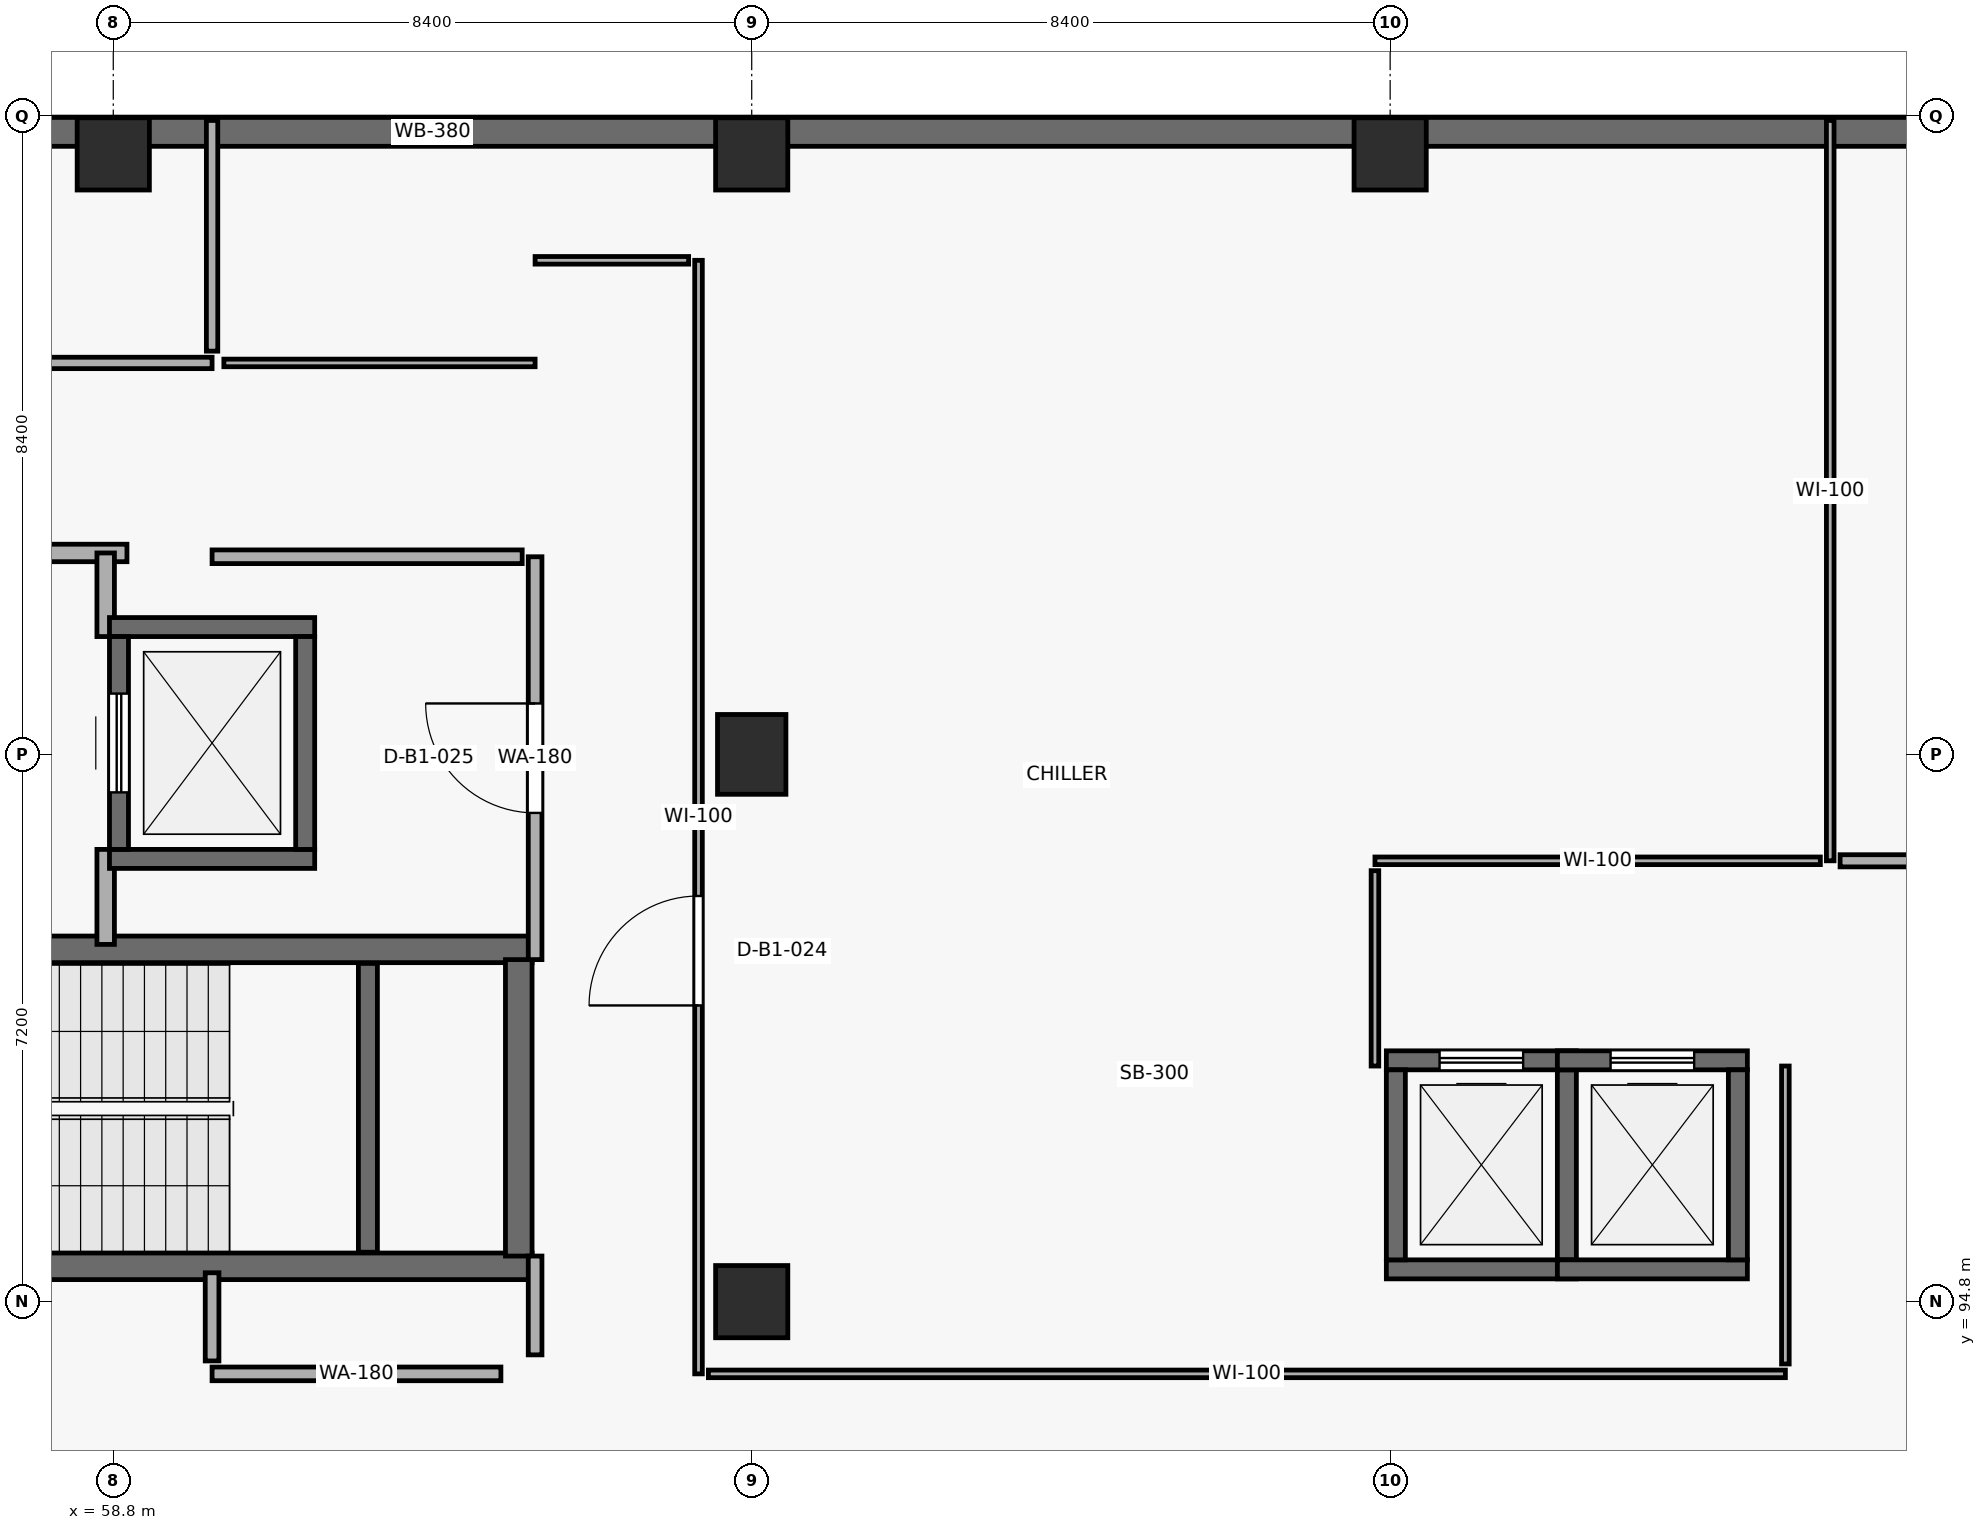
"""IFC4 building model, lengths in metres.
Left out: names, types, materials, properties, quantities, classifications, styles, units other than length and angle.
Written with IfcOpenShell. Run it as: python <this file> out.ifc"""

import sys

from ifc_helpers import new_model, si_unit, direction, frame, frame_2d, origin, origin_2d, place, context, subcontext, project, spatial, rectangle, extrude, element, fill, save


model = new_model("IFC4")
c1 = context("Model", 3, precision=1e-05, world=origin(), true_north=direction((0.0, 1.0)))
c2 = subcontext(c1, "Body", "Model", "MODEL_VIEW")
j1 = project(units=[si_unit("LENGTHUNIT", "METRE"), si_unit("PLANEANGLEUNIT", "RADIAN")], contexts=[c1])
p1 = place(None, origin())
s1 = spatial("IfcSite", under=j1, at=p1, CompositionType="ELEMENT")
p2 = place(p1, origin())
s2 = spatial("IfcBuilding", under=s1, at=p2, CompositionType="ELEMENT")
p3 = place(p2, frame((0.0, 0.0, -4.5)))
s3 = spatial("IfcBuildingStorey", under=s2, at=p3, CompositionType="ELEMENT", Elevation=-4.5)
for number, where, z_axis, x_axis in (
    (1, (58.8, 109.9, -0.3), (0.0, 0.0, 1.0), (1.0, 0.0, 0.0)),
    (2, (67.2, 94.8, -0.3), (0.0, 0.0, 1.0), (1.0, 0.0, 0.0)),
):
    element("IfcColumn", number, at=place(p3, frame(where, z_axis=z_axis, x_axis=x_axis)), inside=s3, PredefinedType="COLUMN", context=c2, shape_type="SweptSolid", body=[
        extrude(rectangle(XDim=0.95, YDim=0.95, at=origin_2d()), origin(), (0.0, 0.0, 1.0), 4.8),
    ])
p4 = place(p3, frame((67.2, 102.0, -0.3), z_axis=(0.0, 0.0, 1.0), x_axis=(1.0, 0.0, 0.0)))
e3 = element("IfcColumn", 3, at=p4, inside=s3, PredefinedType="COLUMN", context=c2, shape_type="SweptSolid", body=[
    extrude(rectangle(XDim=0.9, YDim=1.05, at=origin_2d()), origin(), (0.0, 0.0, 1.0), 4.8),
])
for number, where, z_axis, x_axis in (
    (4, (67.2, 109.9, -0.3), (0.0, 0.0, 1.0), (1.0, 0.0, 0.0)),
    (5, (75.6, 109.9, -0.3), (0.0, 0.0, 1.0), (1.0, 0.0, 0.0)),
):
    element("IfcColumn", number, at=place(p3, frame(where, z_axis=z_axis, x_axis=x_axis)), inside=s3, PredefinedType="COLUMN", context=c2, shape_type="SweptSolid", body=[
        extrude(rectangle(XDim=0.95, YDim=0.95, at=origin_2d()), origin(), (0.0, 0.0, 1.0), 4.8),
    ])
p5 = place(p3, frame((33.6, 110.19, 0.0), z_axis=(0.0, 0.0, 1.0), x_axis=(1.0, 0.0, 0.0)))
e6 = element("IfcWall", 6, at=p5, inside=s3, PredefinedType="SOLIDWALL", context=c2, shape_type="SweptSolid", body=[
    extrude(rectangle(XDim=58.8, YDim=0.38, at=frame_2d((29.4, 0.0))), origin(), (0.0, 0.0, 1.0), 4.22),
])
p6 = place(p3, frame((55.09, 95.265, 0.0), z_axis=(0.0, 0.0, 1.0), x_axis=(1.0, 0.0, 0.0)))
e7 = element("IfcWall", 7, at=p6, inside=s3, PredefinedType="SHEAR", context=c2, shape_type="SweptSolid", body=[
    extrude(rectangle(XDim=9.22, YDim=0.35, at=frame_2d((4.61, 0.0))), origin(), (0.0, 0.0, 1.0), 4.22),
])
p7 = place(p6, frame((0.45, 0.0, 0.0)))
e8 = element("IfcOpeningElement", 8, at=p7, cuts=e7, PredefinedType="OPENING", context=c2, shape_type="SweptSolid", body=[
    extrude(rectangle(XDim=1.25, YDim=2.2, at=frame_2d((0.625, 1.1))), frame((0.0, 0.185, 0.0), z_axis=(0.0, -1.0, 0.0), x_axis=(1.0, 0.0, 0.0)), (0.0, 0.0, 1.0), 0.37),
])
p8 = place(p3, frame((64.31, 99.435, 0.0), z_axis=(0.0, 0.0, 1.0), x_axis=(-1.0, 0.0, 0.0)))
e9 = element("IfcWall", 9, at=p8, inside=s3, PredefinedType="SHEAR", context=c2, shape_type="SweptSolid", body=[
    extrude(rectangle(XDim=9.22, YDim=0.35, at=frame_2d((4.61, 0.0))), origin(), (0.0, 0.0, 1.0), 4.22),
])
p9 = place(p8, frame((7.72, 0.0, 0.0)))
e10 = element("IfcOpeningElement", 10, at=p9, cuts=e9, PredefinedType="OPENING", context=c2, shape_type="SweptSolid", body=[
    extrude(rectangle(XDim=1.2, YDim=2.2, at=frame_2d((0.6, 1.1))), frame((0.0, 0.185, 0.0), z_axis=(0.0, -1.0, 0.0), x_axis=(1.0, 0.0, 0.0)), (0.0, 0.0, 1.0), 0.37),
])
p10 = place(p3, frame((64.135, 99.3, 0.0), z_axis=(0.0, 0.0, 1.0), x_axis=(0.0, -1.0, 0.0)))
e11 = element("IfcWall", 11, at=p10, inside=s3, PredefinedType="SHEAR", context=c2, shape_type="SweptSolid", body=[
    extrude(rectangle(XDim=3.9, YDim=0.35, at=frame_2d((1.95, 0.0))), origin(), (0.0, 0.0, 1.0), 4.22),
])
p11 = place(p3, frame((62.15, 95.45, 0.0), z_axis=(0.0, 0.0, 1.0), x_axis=(0.0, 1.0, 0.0)))
e12 = element("IfcWall", 12, at=p11, inside=s3, PredefinedType="SHEAR", context=c2, shape_type="SweptSolid", body=[
    extrude(rectangle(XDim=3.8, YDim=0.25, at=frame_2d((1.9, 0.0))), origin(), (0.0, 0.0, 1.0), 2.07),
])
p12 = place(p3, frame((55.09, 104.65, 0.0), z_axis=(0.0, 0.0, 1.0), x_axis=(1.0, 0.0, 0.0)))
e13 = element("IfcWall", 13, at=p12, inside=s3, PredefinedType="PARTITIONING", context=c2, shape_type="SweptSolid", body=[
    extrude(rectangle(XDim=3.89, YDim=0.23, at=frame_2d((1.945, 0.0))), origin(), (0.0, 0.0, 1.0), 4.22),
])
p13 = place(p12, frame((1.15, 0.0, 0.0)))
e14 = element("IfcOpeningElement", 14, at=p13, cuts=e13, PredefinedType="OPENING", context=c2, shape_type="SweptSolid", body=[
    extrude(rectangle(XDim=1.2, YDim=2.2, at=frame_2d((0.6, 1.1))), frame((0.0, 0.125, 0.0), z_axis=(0.0, -1.0, 0.0), x_axis=(1.0, 0.0, 0.0)), (0.0, 0.0, 1.0), 0.25),
])
p14 = place(p3, frame((58.7, 104.65, 0.0), z_axis=(0.0, 0.0, 1.0), x_axis=(0.0, -1.0, 0.0)))
e15 = element("IfcWall", 15, at=p14, inside=s3, PredefinedType="PARTITIONING", context=c2, shape_type="SweptSolid", body=[
    extrude(rectangle(XDim=1.1, YDim=0.23, at=frame_2d((0.55, 0.0))), origin(), (0.0, 0.0, 1.0), 4.22),
])
p15 = place(p3, frame((58.7, 100.75, 0.0), z_axis=(0.0, 0.0, 1.0), x_axis=(0.0, -1.0, 0.0)))
e16 = element("IfcWall", 16, at=p15, inside=s3, PredefinedType="PARTITIONING", context=c2, shape_type="SweptSolid", body=[
    extrude(rectangle(XDim=1.25, YDim=0.23, at=frame_2d((0.625, 0.0))), origin(), (0.0, 0.0, 1.0), 4.22),
])
p16 = place(p3, frame((75.55, 95.225, 0.0), z_axis=(0.0, 0.0, 1.0), x_axis=(1.0, 0.0, 0.0)))
e17 = element("IfcWall", 17, at=p16, inside=s3, PredefinedType="SHEAR", context=c2, shape_type="SweptSolid", body=[
    extrude(rectangle(XDim=2.5, YDim=0.25, at=frame_2d((1.25, 0.0))), origin(), (0.0, 0.0, 1.0), 4.22),
])
p17 = place(p3, frame((78.05, 97.975, 0.0), z_axis=(0.0, 0.0, 1.0), x_axis=(-1.0, 0.0, 0.0)))
e18 = element("IfcWall", 18, at=p17, inside=s3, PredefinedType="SHEAR", context=c2, shape_type="SweptSolid", body=[
    extrude(rectangle(XDim=2.5, YDim=0.25, at=frame_2d((1.25, 0.0))), origin(), (0.0, 0.0, 1.0), 4.22),
])
p18 = place(p17, frame((0.7, 0.0, 0.0)))
e19 = element("IfcOpeningElement", 19, at=p18, cuts=e18, PredefinedType="OPENING", context=c2, shape_type="SweptSolid", body=[
    extrude(rectangle(XDim=1.1, YDim=2.2, at=frame_2d((0.55, 1.1))), frame((0.0, 0.135, 0.0), z_axis=(0.0, -1.0, 0.0), x_axis=(1.0, 0.0, 0.0)), (0.0, 0.0, 1.0), 0.27),
])
for number, where, z_axis, x_axis in (
    (20, (75.675, 95.35, 0.0), (0.0, 0.0, 1.0), (0.0, 1.0, 0.0)),
    (21, (77.925, 97.85, 0.0), (0.0, 0.0, 1.0), (0.0, -1.0, 0.0)),
    (22, (77.8, 95.225, 0.0), (0.0, 0.0, 1.0), (1.0, 0.0, 0.0)),
):
    element("IfcWall", number, at=place(p3, frame(where, z_axis=z_axis, x_axis=x_axis)), inside=s3, PredefinedType="SHEAR", context=c2, shape_type="SweptSolid", body=[
        extrude(rectangle(XDim=2.5, YDim=0.25, at=frame_2d((1.25, 0.0))), origin(), (0.0, 0.0, 1.0), 4.22),
    ])
p19 = place(p3, frame((80.3, 97.975, 0.0), z_axis=(0.0, 0.0, 1.0), x_axis=(-1.0, 0.0, 0.0)))
e23 = element("IfcWall", 23, at=p19, inside=s3, PredefinedType="SHEAR", context=c2, shape_type="SweptSolid", body=[
    extrude(rectangle(XDim=2.5, YDim=0.25, at=frame_2d((1.25, 0.0))), origin(), (0.0, 0.0, 1.0), 4.22),
])
p20 = place(p19, frame((0.7, 0.0, 0.0)))
e24 = element("IfcOpeningElement", 24, at=p20, cuts=e23, PredefinedType="OPENING", context=c2, shape_type="SweptSolid", body=[
    extrude(rectangle(XDim=1.1, YDim=2.2, at=frame_2d((0.55, 1.1))), frame((0.0, 0.135, 0.0), z_axis=(0.0, -1.0, 0.0), x_axis=(1.0, 0.0, 0.0)), (0.0, 0.0, 1.0), 0.27),
])
p21 = place(p3, frame((80.175, 97.85, 0.0), z_axis=(0.0, 0.0, 1.0), x_axis=(0.0, -1.0, 0.0)))
e25 = element("IfcWall", 25, at=p21, inside=s3, PredefinedType="SHEAR", context=c2, shape_type="SweptSolid", body=[
    extrude(rectangle(XDim=2.5, YDim=0.25, at=frame_2d((1.25, 0.0))), origin(), (0.0, 0.0, 1.0), 4.22),
])
for number, where, z_axis, x_axis in (
    (26, (58.75, 100.625, 0.0), (0.0, 0.0, 1.0), (1.0, 0.0, 0.0)),
    (27, (61.45, 103.675, 0.0), (0.0, 0.0, 1.0), (-1.0, 0.0, 0.0)),
):
    element("IfcWall", number, at=place(p3, frame(where, z_axis=z_axis, x_axis=x_axis)), inside=s3, PredefinedType="SHEAR", context=c2, shape_type="SweptSolid", body=[
        extrude(rectangle(XDim=2.7, YDim=0.25, at=frame_2d((1.35, 0.0))), origin(), (0.0, 0.0, 1.0), 4.22),
    ])
p22 = place(p3, frame((58.875, 100.75, 0.0), z_axis=(0.0, 0.0, 1.0), x_axis=(0.0, 1.0, 0.0)))
e28 = element("IfcWall", 28, at=p22, inside=s3, PredefinedType="SHEAR", context=c2, shape_type="SweptSolid", body=[
    extrude(rectangle(XDim=2.8, YDim=0.25, at=frame_2d((1.4, 0.0))), origin(), (0.0, 0.0, 1.0), 4.22),
])
p23 = place(p22, frame((0.75, 0.0, 0.0)))
e29 = element("IfcOpeningElement", 29, at=p23, cuts=e28, PredefinedType="OPENING", context=c2, shape_type="SweptSolid", body=[
    extrude(rectangle(XDim=1.3, YDim=2.25, at=frame_2d((0.65, 1.125))), frame((0.0, 0.135, 0.0), z_axis=(0.0, -1.0, 0.0), x_axis=(1.0, 0.0, 0.0)), (0.0, 0.0, 1.0), 0.27),
])
p24 = place(p3, frame((61.325, 103.55, 0.0), z_axis=(0.0, 0.0, 1.0), x_axis=(0.0, -1.0, 0.0)))
e30 = element("IfcWall", 30, at=p24, inside=s3, PredefinedType="SHEAR", context=c2, shape_type="SweptSolid", body=[
    extrude(rectangle(XDim=2.8, YDim=0.25, at=frame_2d((1.4, 0.0))), origin(), (0.0, 0.0, 1.0), 4.22),
])
p25 = place(p3, frame((66.5, 93.85, 0.0), z_axis=(0.0, 0.0, 1.0), x_axis=(0.0, 1.0, 0.0)))
e31 = element("IfcWall", 31, at=p25, inside=s3, PredefinedType="PARTITIONING", context=c2, shape_type="SweptSolid", body=[
    extrude(rectangle(XDim=14.65, YDim=0.1, at=frame_2d((7.325, 0.0))), origin(), (0.0, 0.0, 1.0), 4.22),
])
p26 = place(p25, frame((4.847, 0.0, 0.0)))
e32 = element("IfcOpeningElement", 32, at=p26, cuts=e31, PredefinedType="OPENING", context=c2, shape_type="SweptSolid", body=[
    extrude(rectangle(XDim=1.44, YDim=2.34, at=frame_2d((0.72, 1.17))), frame((0.0, 0.06, 0.0), z_axis=(0.0, -1.0, 0.0), x_axis=(1.0, 0.0, 0.0)), (0.0, 0.0, 1.0), 0.12),
])
p27 = place(p3, frame((80.8, 93.85, 0.0), z_axis=(0.0, 0.0, 1.0), x_axis=(-1.0, 0.0, 0.0)))
e33 = element("IfcWall", 33, at=p27, inside=s3, PredefinedType="PARTITIONING", context=c2, shape_type="SweptSolid", body=[
    extrude(rectangle(XDim=14.17, YDim=0.1, at=frame_2d((7.085, 0.0))), origin(), (0.0, 0.0, 1.0), 4.22),
])
p28 = place(p3, frame((64.35, 104.6, 0.0), z_axis=(0.0, 0.0, 1.0), x_axis=(0.0, -1.0, 0.0)))
e34 = element("IfcWall", 34, at=p28, inside=s3, PredefinedType="PARTITIONING", context=c2, shape_type="SweptSolid", body=[
    extrude(rectangle(XDim=5.3, YDim=0.18, at=frame_2d((2.65, 0.0))), origin(), (0.0, 0.0, 1.0), 4.22),
])
p29 = place(p28, frame((1.93, 0.0, 0.0)))
e35 = element("IfcOpeningElement", 35, at=p29, cuts=e34, PredefinedType="OPENING", context=c2, shape_type="SweptSolid", body=[
    extrude(rectangle(XDim=1.44, YDim=2.34, at=frame_2d((0.72, 1.17))), frame((0.0, 0.1, 0.0), z_axis=(0.0, -1.0, 0.0), x_axis=(1.0, 0.0, 0.0)), (0.0, 0.0, 1.0), 0.2),
])
p30 = place(p3, frame((64.35, 95.4, 0.0), z_axis=(0.0, 0.0, 1.0), x_axis=(0.0, -1.0, 0.0)))
e36 = element("IfcWall", 36, at=p30, inside=s3, PredefinedType="PARTITIONING", context=c2, shape_type="SweptSolid", body=[
    extrude(rectangle(XDim=1.3, YDim=0.18, at=frame_2d((0.65, 0.0))), origin(), (0.0, 0.0, 1.0), 4.22),
])
p31 = place(p3, frame((81.39, 110.34, 0.0), z_axis=(0.0, 0.0, 1.0), x_axis=(0.0, -1.0, 0.0)))
e37 = element("IfcWall", 37, at=p31, inside=s3, PredefinedType="PARTITIONING", context=c2, shape_type="SweptSolid", body=[
    extrude(rectangle(XDim=9.74, YDim=0.1, at=frame_2d((4.87, 0.0))), origin(), (0.0, 0.0, 1.0), 4.22),
])
p32 = place(p3, frame((60.1, 107.15, 0.0), z_axis=(0.0, 0.0, 1.0), x_axis=(-1.0, 0.0, 0.0)))
e38 = element("IfcWall", 38, at=p32, inside=s3, PredefinedType="PARTITIONING", context=c2, shape_type="SweptSolid", body=[
    extrude(rectangle(XDim=7.5, YDim=0.15, at=frame_2d((3.75, 0.0))), origin(), (0.0, 0.0, 1.0), 4.22),
])
p33 = place(p3, frame((81.26, 100.6, 0.0), z_axis=(0.0, 0.0, 1.0), x_axis=(-1.0, 0.0, 0.0)))
e39 = element("IfcWall", 39, at=p33, inside=s3, PredefinedType="PARTITIONING", context=c2, shape_type="SweptSolid", body=[
    extrude(rectangle(XDim=5.86, YDim=0.1, at=frame_2d((2.93, 0.0))), origin(), (0.0, 0.0, 1.0), 4.22),
])
p34 = place(p3, frame((64.35, 107.15, 0.0), z_axis=(0.0, 0.0, 1.0), x_axis=(-1.0, 0.0, 0.0)))
e40 = element("IfcWall", 40, at=p34, inside=s3, PredefinedType="PARTITIONING", context=c2, shape_type="SweptSolid", body=[
    extrude(rectangle(XDim=4.095, YDim=0.1, at=frame_2d((2.048, 0.0))), origin(), (0.0, 0.0, 1.0), 4.22),
])
p35 = place(p3, frame((60.1, 104.6, 0.0), z_axis=(0.0, 0.0, 1.0), x_axis=(1.0, 0.0, 0.0)))
e41 = element("IfcWall", 41, at=p35, inside=s3, PredefinedType="PARTITIONING", context=c2, shape_type="SweptSolid", body=[
    extrude(rectangle(XDim=4.08, YDim=0.18, at=frame_2d((2.04, 0.0))), origin(), (0.0, 0.0, 1.0), 4.22),
])
p36 = place(p3, frame((80.8, 97.9, 0.0), z_axis=(0.0, 0.0, 1.0), x_axis=(0.0, -1.0, 0.0)))
e42 = element("IfcWall", 42, at=p36, inside=s3, PredefinedType="PARTITIONING", context=c2, shape_type="SweptSolid", body=[
    extrude(rectangle(XDim=3.92, YDim=0.1, at=frame_2d((1.96, 0.0))), origin(), (0.0, 0.0, 1.0), 4.22),
])
p37 = place(p3, frame((63.9, 93.85, 0.0), z_axis=(0.0, 0.0, 1.0), x_axis=(-1.0, 0.0, 0.0)))
e43 = element("IfcWall", 43, at=p37, inside=s3, PredefinedType="PARTITIONING", context=c2, shape_type="SweptSolid", body=[
    extrude(rectangle(XDim=3.8, YDim=0.18, at=frame_2d((1.9, 0.0))), origin(), (0.0, 0.0, 1.0), 4.22),
])
p38 = place(p3, frame((60.1, 110.34, 0.0), z_axis=(0.0, 0.0, 1.0), x_axis=(0.0, -1.0, 0.0)))
e44 = element("IfcWall", 44, at=p38, inside=s3, PredefinedType="PARTITIONING", context=c2, shape_type="SweptSolid", body=[
    extrude(rectangle(XDim=3.035, YDim=0.15, at=frame_2d((1.518, 0.0))), origin(), (0.0, 0.0, 1.0), 4.22),
])
p39 = place(p3, frame((75.4, 100.47, 0.0), z_axis=(0.0, 0.0, 1.0), x_axis=(0.0, -1.0, 0.0)))
e45 = element("IfcWall", 45, at=p39, inside=s3, PredefinedType="PARTITIONING", context=c2, shape_type="SweptSolid", body=[
    extrude(rectangle(XDim=2.57, YDim=0.1, at=frame_2d((1.285, 0.0))), origin(), (0.0, 0.0, 1.0), 3.01),
])
p40 = place(p3, frame((66.37, 108.5, 0.0), z_axis=(0.0, 0.0, 1.0), x_axis=(-1.0, 0.0, 0.0)))
e46 = element("IfcWall", 46, at=p40, inside=s3, PredefinedType="PARTITIONING", context=c2, shape_type="SweptSolid", body=[
    extrude(rectangle(XDim=2.02, YDim=0.1, at=frame_2d((1.01, 0.0))), origin(), (0.0, 0.0, 1.0), 4.22),
])
p41 = place(p3, frame((83.04, 100.6, 0.0), z_axis=(0.0, 0.0, 1.0), x_axis=(-1.0, 0.0, 0.0)))
e47 = element("IfcWall", 47, at=p41, inside=s3, PredefinedType="PARTITIONING", context=c2, shape_type="SweptSolid", body=[
    extrude(rectangle(XDim=1.52, YDim=0.16, at=frame_2d((0.76, 0.0))), origin(), (0.0, 0.0, 1.0), 4.22),
])
p42 = place(p3, frame((60.1, 94.02, 0.0), z_axis=(0.0, 0.0, 1.0), x_axis=(0.0, 1.0, 0.0)))
e48 = element("IfcWall", 48, at=p42, inside=s3, PredefinedType="PARTITIONING", context=c2, shape_type="SweptSolid", body=[
    extrude(rectangle(XDim=1.16, YDim=0.18, at=frame_2d((0.58, 0.0))), origin(), (0.0, 0.0, 1.0), 4.22),
])
p43 = place(p18, origin())
e49 = element("IfcDoor", 49, at=p43, inside=s3, OperationType="SLIDING_TO_LEFT", PredefinedType="DOOR", context=c2, shape_type="SweptSolid", body=[
    extrude(rectangle(XDim=1.1, YDim=2.2, at=frame_2d((0.55, 1.1))), frame((0.0, 0.025, 0.0), z_axis=(0.0, -1.0, 0.0), x_axis=(1.0, 0.0, 0.0)), (0.0, 0.0, 1.0), 0.05),
])
fill(e19, e49)
p44 = place(p20, origin())
e50 = element("IfcDoor", 50, at=p44, inside=s3, OperationType="SLIDING_TO_LEFT", PredefinedType="DOOR", context=c2, shape_type="SweptSolid", body=[
    extrude(rectangle(XDim=1.1, YDim=2.2, at=frame_2d((0.55, 1.1))), frame((0.0, 0.025, 0.0), z_axis=(0.0, -1.0, 0.0), x_axis=(1.0, 0.0, 0.0)), (0.0, 0.0, 1.0), 0.05),
])
fill(e24, e50)
p45 = place(p23, origin())
e51 = element("IfcDoor", 51, at=p45, inside=s3, OperationType="SLIDING_TO_LEFT", PredefinedType="DOOR", context=c2, shape_type="SweptSolid", body=[
    extrude(rectangle(XDim=1.3, YDim=2.25, at=frame_2d((0.65, 1.125))), frame((0.0, 0.025, 0.0), z_axis=(0.0, -1.0, 0.0), x_axis=(1.0, 0.0, 0.0)), (0.0, 0.0, 1.0), 0.05),
])
fill(e29, e51)
p46 = place(p26, origin())
e52 = element("IfcDoor", 52, at=p46, inside=s3, OperationType="SINGLE_SWING_LEFT", PredefinedType="DOOR", context=c2, shape_type="SweptSolid", body=[
    extrude(rectangle(XDim=1.44, YDim=2.34, at=frame_2d((0.72, 1.17))), frame((0.0, 0.025, 0.0), z_axis=(0.0, -1.0, 0.0), x_axis=(1.0, 0.0, 0.0)), (0.0, 0.0, 1.0), 0.05),
])
fill(e32, e52)
p47 = place(p29, origin())
e53 = element("IfcDoor", 53, at=p47, inside=s3, OperationType="SINGLE_SWING_RIGHT", PredefinedType="DOOR", context=c2, shape_type="SweptSolid", body=[
    extrude(rectangle(XDim=1.44, YDim=2.34, at=frame_2d((0.72, 1.17))), frame((0.0, 0.025, 0.0), z_axis=(0.0, -1.0, 0.0), x_axis=(1.0, 0.0, 0.0)), (0.0, 0.0, 1.0), 0.05),
])
fill(e35, e53)
save(model, sys.argv[1])
